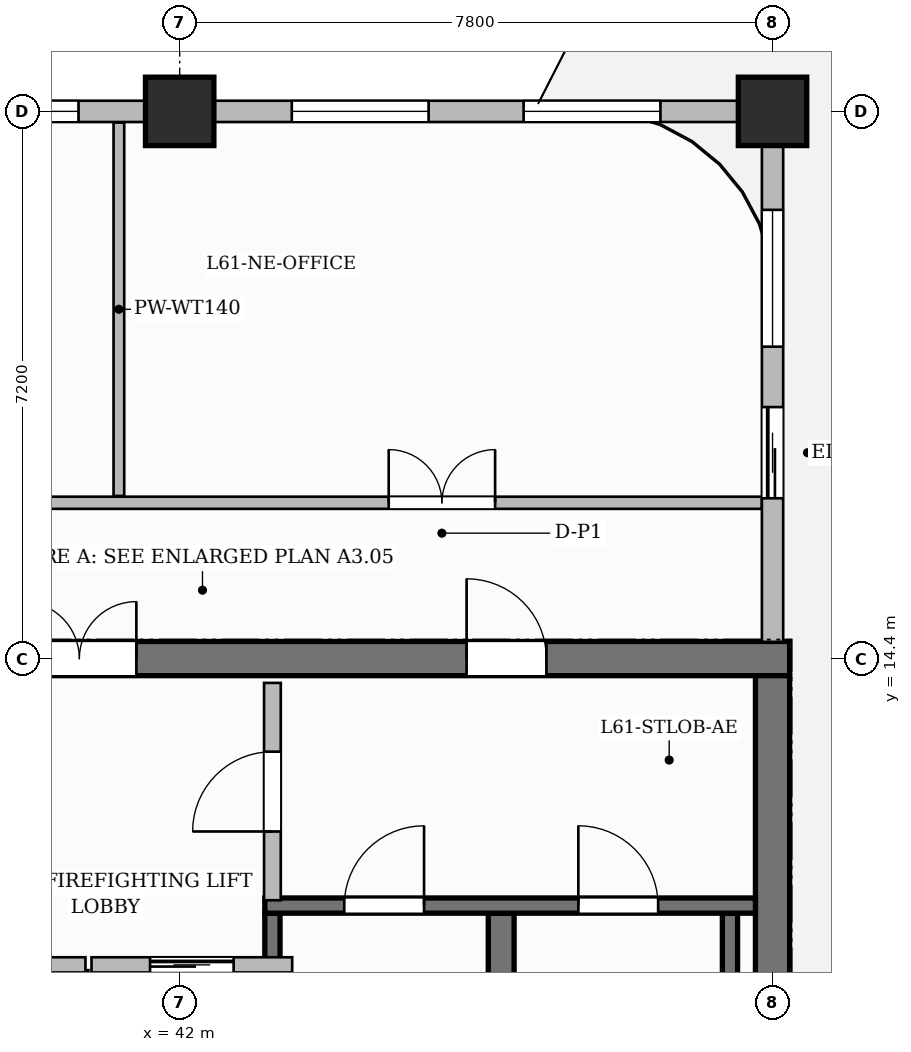
"""IFC4 building model, lengths in metres.
Left out: names, types, materials, properties, quantities, classifications, styles, units other than length and angle.
Written with IfcOpenShell. Run it as: python <this file> out.ifc"""

import sys

from ifc_helpers import new_model, si_unit, direction, frame, frame_2d, origin, origin_2d, place, context, subcontext, project, spatial, rectangle, extrude, source, transform, mapped, element, fill, save


model = new_model("IFC4")
c1 = context("Model", 3, precision=1e-05, world=origin(), true_north=direction((0.0, 1.0)))
c2 = subcontext(c1, "Body", "Model", "MODEL_VIEW")
j1 = project(units=[si_unit("LENGTHUNIT", "METRE"), si_unit("PLANEANGLEUNIT", "RADIAN")], contexts=[c1])
p1 = place(None, origin())
s1 = spatial("IfcSite", under=j1, at=p1, CompositionType="ELEMENT")
p2 = place(p1, origin())
s2 = spatial("IfcBuilding", under=s1, at=p2, CompositionType="ELEMENT")
p3 = place(p2, frame((0.0, 0.0, 244.25)))
s3 = spatial("IfcBuildingStorey", under=s2, at=p3, CompositionType="ELEMENT", Elevation=244.25)
p4 = place(p3, frame((34.575, 14.4, 0.0), z_axis=(0.0, 0.0, 1.0), x_axis=(1.0, 0.0, 0.0)))
e1 = element("IfcWall", 1, at=p4, inside=s3, PredefinedType="SHEAR", context=c2, shape_type="SweptSolid", body=[
    extrude(rectangle(XDim=15.45, YDim=0.45, at=frame_2d((7.725, 0.0))), origin(), (0.0, 0.0, 1.0), 3.85),
])
p5 = place(p4, frame((5.355, 0.0, 0.0)))
e2 = element("IfcOpeningElement", 2, at=p5, cuts=e1, PredefinedType="OPENING", context=c2, shape_type="SweptSolid", body=[
    extrude(rectangle(XDim=1.5, YDim=2.2, at=frame_2d((0.75, 1.1))), frame((0.0, 0.235, 0.0), z_axis=(0.0, -1.0, 0.0), x_axis=(1.0, 0.0, 0.0)), (0.0, 0.0, 1.0), 0.47),
])
p6 = place(p4, frame((1.57, 0.0, 0.0)))
e3 = element("IfcOpeningElement", 3, at=p6, cuts=e1, PredefinedType="OPENING", context=c2, shape_type="SweptSolid", body=[
    extrude(rectangle(XDim=1.05, YDim=2.15, at=frame_2d((0.525, 1.075))), frame((0.0, 0.235, 0.0), z_axis=(0.0, -1.0, 0.0), x_axis=(1.0, 0.0, 0.0)), (0.0, 0.0, 1.0), 0.47),
])
p7 = place(p4, frame((11.2, 0.0, 0.0)))
e4 = element("IfcOpeningElement", 4, at=p7, cuts=e1, PredefinedType="OPENING", context=c2, shape_type="SweptSolid", body=[
    extrude(rectangle(XDim=1.05, YDim=2.15, at=frame_2d((0.525, 1.075))), frame((0.0, 0.235, 0.0), z_axis=(0.0, -1.0, 0.0), x_axis=(1.0, 0.0, 0.0)), (0.0, 0.0, 1.0), 0.47),
])
p8 = place(p3, frame((49.8, 3.825, 0.0), z_axis=(0.0, 0.0, 1.0), x_axis=(0.0, 1.0, 0.0)))
e5 = element("IfcWall", 5, at=p8, inside=s3, PredefinedType="SHEAR", context=c2, shape_type="SweptSolid", body=[
    extrude(rectangle(XDim=10.35, YDim=0.45, at=frame_2d((5.175, 0.0))), origin(), (0.0, 0.0, 1.0), 3.85),
])
m1 = source(origin(), c2, "Body", "SweptSolid", [
    extrude(rectangle(XDim=0.9, YDim=0.9, at=origin_2d()), origin(), (0.0, 0.0, 1.0), 3.85),
])
for number, where, z_axis, x_axis in (
    (6, (42.0, 21.6, 0.0), (0.0, 0.0, 1.0), (1.0, 0.0, 0.0)),
    (7, (49.8, 21.6, 0.0), (0.0, 0.0, 1.0), (1.0, 0.0, 0.0)),
):
    element("IfcColumn", number, at=place(p3, frame(where, z_axis=z_axis, x_axis=x_axis)), inside=s3, PredefinedType="COLUMN", context=c2, shape_type="MappedRepresentation", body=[
        mapped(m1, transform((0.0, 0.0, 0.0), scale=1.0)),
    ])
p9 = place(p3, frame((43.22, 4.1, 0.0), z_axis=(0.0, 0.0, 1.0), x_axis=(0.0, 1.0, 0.0)))
e8 = element("IfcWall", 8, at=p9, inside=s3, PredefinedType="SHEAR", context=c2, shape_type="SweptSolid", body=[
    extrude(rectangle(XDim=6.95, YDim=0.2, at=frame_2d((3.475, 0.0))), origin(), (0.0, 0.0, 1.0), 3.85),
])
p10 = place(p3, frame((46.23, 4.1, 0.0), z_axis=(0.0, 0.0, 1.0), x_axis=(0.0, 1.0, 0.0)))
e9 = element("IfcWall", 9, at=p10, inside=s3, PredefinedType="SHEAR", context=c2, shape_type="SweptSolid", body=[
    extrude(rectangle(XDim=6.95, YDim=0.34, at=frame_2d((3.475, 0.0))), origin(), (0.0, 0.0, 1.0), 3.85),
])
p11 = place(p3, frame((49.24, 4.1, 0.0), z_axis=(0.0, 0.0, 1.0), x_axis=(0.0, 1.0, 0.0)))
e10 = element("IfcWall", 10, at=p11, inside=s3, PredefinedType="SHEAR", context=c2, shape_type="SweptSolid", body=[
    extrude(rectangle(XDim=6.95, YDim=0.2, at=frame_2d((3.475, 0.0))), origin(), (0.0, 0.0, 1.0), 3.85),
])
p12 = place(p3, frame((43.12, 11.15, 0.0), z_axis=(0.0, 0.0, 1.0), x_axis=(1.0, 0.0, 0.0)))
e11 = element("IfcWall", 11, at=p12, inside=s3, PredefinedType="SHEAR", context=c2, shape_type="SweptSolid", body=[
    extrude(rectangle(XDim=6.455, YDim=0.2, at=frame_2d((3.228, 0.0))), origin(), (0.0, 0.0, 1.0), 3.85),
])
p13 = place(p12, frame((1.045, 0.0, 0.0)))
e12 = element("IfcOpeningElement", 12, at=p13, cuts=e11, PredefinedType="OPENING", context=c2, shape_type="SweptSolid", body=[
    extrude(rectangle(XDim=1.05, YDim=2.2, at=frame_2d((0.525, 1.1))), frame((0.0, 0.11, 0.0), z_axis=(0.0, -1.0, 0.0), x_axis=(1.0, 0.0, 0.0)), (0.0, 0.0, 1.0), 0.22),
])
p14 = place(p12, frame((4.125, 0.0, 0.0)))
e13 = element("IfcOpeningElement", 13, at=p14, cuts=e11, PredefinedType="OPENING", context=c2, shape_type="SweptSolid", body=[
    extrude(rectangle(XDim=1.05, YDim=2.2, at=frame_2d((0.525, 1.1))), frame((0.0, 0.11, 0.0), z_axis=(0.0, -1.0, 0.0), x_axis=(1.0, 0.0, 0.0)), (0.0, 0.0, 1.0), 0.22),
])
p15 = place(p3, frame((40.7, 8.12, 0.0), z_axis=(0.0, 0.0, 1.0), x_axis=(0.0, 1.0, 0.0)))
e14 = element("IfcWall", 14, at=p15, inside=s3, PredefinedType="PARTITIONING", context=c2, shape_type="SweptSolid", body=[
    extrude(rectangle(XDim=2.18, YDim=0.2, at=frame_2d((1.09, 0.0))), origin(), (0.0, 0.0, 1.0), 3.6),
])
p16 = place(p3, frame((43.22, 11.22, 0.0), z_axis=(0.0, 0.0, 1.0), x_axis=(0.0, 1.0, 0.0)))
e15 = element("IfcWall", 15, at=p16, inside=s3, PredefinedType="PARTITIONING", context=c2, shape_type="SweptSolid", body=[
    extrude(rectangle(XDim=2.86, YDim=0.22, at=frame_2d((1.43, 0.0))), origin(), (0.0, 0.0, 1.0), 3.6),
])
p17 = place(p16, frame((0.905, 0.0, 0.0)))
e16 = element("IfcOpeningElement", 16, at=p17, cuts=e15, PredefinedType="OPENING", context=c2, shape_type="SweptSolid", body=[
    extrude(rectangle(XDim=1.05, YDim=2.15, at=frame_2d((0.525, 1.075))), frame((0.0, 0.12, 0.0), z_axis=(0.0, -1.0, 0.0), x_axis=(1.0, 0.0, 0.0)), (0.0, 0.0, 1.0), 0.24),
])
p18 = place(p3, frame((30.29, 16.45, 0.0), z_axis=(0.0, 0.0, 1.0), x_axis=(1.0, 0.0, 0.0)))
e17 = element("IfcWall", 17, at=p18, inside=s3, PredefinedType="PARTITIONING", context=c2, shape_type="SweptSolid", body=[
    extrude(rectangle(XDim=19.37, YDim=0.16, at=frame_2d((9.685, 0.0))), origin(), (0.0, 0.0, 1.0), 3.6),
])
p19 = place(p18, frame((1.185, 0.0, 0.0)))
e18 = element("IfcOpeningElement", 18, at=p19, cuts=e17, PredefinedType="OPENING", context=c2, shape_type="SweptSolid", body=[
    extrude(rectangle(XDim=0.85, YDim=2.1, at=frame_2d((0.425, 1.05))), frame((0.0, 0.09, 0.0), z_axis=(0.0, -1.0, 0.0), x_axis=(1.0, 0.0, 0.0)), (0.0, 0.0, 1.0), 0.18),
])
p20 = place(p18, frame((6.66, 0.0, 0.0)))
e19 = element("IfcOpeningElement", 19, at=p20, cuts=e17, PredefinedType="OPENING", context=c2, shape_type="SweptSolid", body=[
    extrude(rectangle(XDim=0.9, YDim=2.15, at=frame_2d((0.45, 1.075))), frame((0.0, 0.09, 0.0), z_axis=(0.0, -1.0, 0.0), x_axis=(1.0, 0.0, 0.0)), (0.0, 0.0, 1.0), 0.18),
])
p21 = place(p18, frame((14.46, 0.0, 0.0)))
e20 = element("IfcOpeningElement", 20, at=p21, cuts=e17, PredefinedType="OPENING", context=c2, shape_type="SweptSolid", body=[
    extrude(rectangle(XDim=1.4, YDim=2.35, at=frame_2d((0.7, 1.175))), frame((0.0, 0.09, 0.0), z_axis=(0.0, -1.0, 0.0), x_axis=(1.0, 0.0, 0.0)), (0.0, 0.0, 1.0), 0.18),
])
p22 = place(p3, frame((41.2, 16.54, 0.0), z_axis=(0.0, 0.0, 1.0), x_axis=(0.0, 1.0, 0.0)))
e21 = element("IfcWall", 21, at=p22, inside=s3, PredefinedType="PARTITIONING", context=c2, shape_type="SweptSolid", body=[
    extrude(rectangle(XDim=4.912, YDim=0.14, at=frame_2d((2.456, 0.0))), origin(), (0.0, 0.0, 1.0), 3.6),
])
p23 = place(p3, frame((38.12, 10.37, 0.0), z_axis=(0.0, 0.0, 1.0), x_axis=(1.0, 0.0, 0.0)))
e22 = element("IfcWall", 22, at=p23, inside=s3, PredefinedType="PARTITIONING", context=c2, shape_type="SweptSolid", body=[
    extrude(rectangle(XDim=2.64, YDim=0.2, at=frame_2d((1.32, 0.0))), origin(), (0.0, 0.0, 1.0), 3.6),
])
p24 = place(p23, frame((0.77, 0.0, 0.0)))
e23 = element("IfcOpeningElement", 23, at=p24, cuts=e22, PredefinedType="OPENING", context=c2, shape_type="SweptSolid", body=[
    extrude(rectangle(XDim=1.1, YDim=2.2, at=frame_2d((0.55, 1.1))), frame((0.0, 0.11, 0.0), z_axis=(0.0, -1.0, 0.0), x_axis=(1.0, 0.0, 0.0)), (0.0, 0.0, 1.0), 0.22),
])
p25 = place(p3, frame((40.84, 10.37, 0.0), z_axis=(0.0, 0.0, 1.0), x_axis=(1.0, 0.0, 0.0)))
e24 = element("IfcWall", 24, at=p25, inside=s3, PredefinedType="PARTITIONING", context=c2, shape_type="SweptSolid", body=[
    extrude(rectangle(XDim=2.64, YDim=0.2, at=frame_2d((1.32, 0.0))), origin(), (0.0, 0.0, 1.0), 3.6),
])
p26 = place(p25, frame((0.77, 0.0, 0.0)))
e25 = element("IfcOpeningElement", 25, at=p26, cuts=e24, PredefinedType="OPENING", context=c2, shape_type="SweptSolid", body=[
    extrude(rectangle(XDim=1.1, YDim=2.2, at=frame_2d((0.55, 1.1))), frame((0.0, 0.11, 0.0), z_axis=(0.0, -1.0, 0.0), x_axis=(1.0, 0.0, 0.0)), (0.0, 0.0, 1.0), 0.22),
])
p27 = place(p3, frame((49.8, 14.62, 0.0), z_axis=(0.0, 0.0, 1.0), x_axis=(0.0, 1.0, 0.0)))
e26 = element("IfcWall", 26, at=p27, inside=s3, PredefinedType="SOLIDWALL", context=c2, shape_type="SweptSolid", body=[
    extrude(rectangle(XDim=6.93, YDim=0.28, at=frame_2d((3.465, 0.0))), origin(), (0.0, 0.0, 1.0), 3.135),
])
p28 = place(p27, frame((1.889, 0.0, 0.0)))
e27 = element("IfcOpeningElement", 27, at=p28, cuts=e26, PredefinedType="OPENING", context=c2, shape_type="SweptSolid", body=[
    extrude(rectangle(XDim=1.2, YDim=2.2, at=frame_2d((0.6, 1.1))), frame((0.0, 0.15, 0.0), z_axis=(0.0, -1.0, 0.0), x_axis=(1.0, 0.0, 0.0)), (0.0, 0.0, 1.0), 0.3),
])
p29 = place(p27, frame((3.884, 0.0, 0.8)))
e28 = element("IfcOpeningElement", 28, at=p29, cuts=e26, PredefinedType="OPENING", context=c2, shape_type="SweptSolid", body=[
    extrude(rectangle(XDim=1.8, YDim=1.85, at=frame_2d((0.9, 0.925))), frame((0.0, 0.15, 0.0), z_axis=(0.0, -1.0, 0.0), x_axis=(1.0, 0.0, 0.0)), (0.0, 0.0, 1.0), 0.3),
])
p30 = place(p3, frame((14.4, 21.6, 0.0), z_axis=(0.0, 0.0, 1.0), x_axis=(1.0, 0.0, 0.0)))
e29 = element("IfcWall", 29, at=p30, inside=s3, PredefinedType="SOLIDWALL", context=c2, shape_type="SweptSolid", body=[
    extrude(rectangle(XDim=35.4, YDim=0.28, at=frame_2d((17.7, 0.0))), origin(), (0.0, 0.0, 1.0), 3.135),
])
p31 = place(p30, frame((0.85, 0.0, 0.0)))
e30 = element("IfcOpeningElement", 30, at=p31, cuts=e29, PredefinedType="OPENING", context=c2, shape_type="SweptSolid", body=[
    extrude(rectangle(XDim=1.2, YDim=2.2, at=frame_2d((0.6, 1.1))), frame((0.0, 0.15, 0.0), z_axis=(0.0, -1.0, 0.0), x_axis=(1.0, 0.0, 0.0)), (0.0, 0.0, 1.0), 0.3),
])
p32 = place(p30, frame((2.771, 0.0, 0.8)))
e31 = element("IfcOpeningElement", 31, at=p32, cuts=e29, PredefinedType="OPENING", context=c2, shape_type="SweptSolid", body=[
    extrude(rectangle(XDim=1.4, YDim=1.85, at=frame_2d((0.7, 0.925))), frame((0.0, 0.15, 0.0), z_axis=(0.0, -1.0, 0.0), x_axis=(1.0, 0.0, 0.0)), (0.0, 0.0, 1.0), 0.3),
])
p33 = place(p30, frame((4.929, 0.0, 0.8)))
e32 = element("IfcOpeningElement", 32, at=p33, cuts=e29, PredefinedType="OPENING", context=c2, shape_type="SweptSolid", body=[
    extrude(rectangle(XDim=1.15, YDim=1.8, at=frame_2d((0.575, 0.9))), frame((0.0, 0.15, 0.0), z_axis=(0.0, -1.0, 0.0), x_axis=(1.0, 0.0, 0.0)), (0.0, 0.0, 1.0), 0.3),
])
p34 = place(p30, frame((8.496, 0.0, 0.8)))
e33 = element("IfcOpeningElement", 33, at=p34, cuts=e29, PredefinedType="OPENING", context=c2, shape_type="SweptSolid", body=[
    extrude(rectangle(XDim=1.8, YDim=1.85, at=frame_2d((0.9, 0.925))), frame((0.0, 0.15, 0.0), z_axis=(0.0, -1.0, 0.0), x_axis=(1.0, 0.0, 0.0)), (0.0, 0.0, 1.0), 0.3),
])
p35 = place(p30, frame((11.304, 0.0, 0.8)))
e34 = element("IfcOpeningElement", 34, at=p35, cuts=e29, PredefinedType="OPENING", context=c2, shape_type="SweptSolid", body=[
    extrude(rectangle(XDim=1.8, YDim=1.85, at=frame_2d((0.9, 0.925))), frame((0.0, 0.15, 0.0), z_axis=(0.0, -1.0, 0.0), x_axis=(1.0, 0.0, 0.0)), (0.0, 0.0, 1.0), 0.3),
])
p36 = place(p30, frame((16.601, 0.0, 0.8)))
e35 = element("IfcOpeningElement", 35, at=p36, cuts=e29, PredefinedType="OPENING", context=c2, shape_type="SweptSolid", body=[
    extrude(rectangle(XDim=1.8, YDim=1.85, at=frame_2d((0.9, 0.925))), frame((0.0, 0.15, 0.0), z_axis=(0.0, -1.0, 0.0), x_axis=(1.0, 0.0, 0.0)), (0.0, 0.0, 1.0), 0.3),
])
p37 = place(p30, frame((21.723, 0.0, 0.8)))
e36 = element("IfcOpeningElement", 36, at=p37, cuts=e29, PredefinedType="OPENING", context=c2, shape_type="SweptSolid", body=[
    extrude(rectangle(XDim=1.8, YDim=1.85, at=frame_2d((0.9, 0.925))), frame((0.0, 0.15, 0.0), z_axis=(0.0, -1.0, 0.0), x_axis=(1.0, 0.0, 0.0)), (0.0, 0.0, 1.0), 0.3),
])
p38 = place(p30, frame((24.469, 0.0, 0.8)))
e37 = element("IfcOpeningElement", 37, at=p38, cuts=e29, PredefinedType="OPENING", context=c2, shape_type="SweptSolid", body=[
    extrude(rectangle(XDim=1.8, YDim=1.85, at=frame_2d((0.9, 0.925))), frame((0.0, 0.15, 0.0), z_axis=(0.0, -1.0, 0.0), x_axis=(1.0, 0.0, 0.0)), (0.0, 0.0, 1.0), 0.3),
])
p39 = place(p30, frame((29.075, 0.0, 0.8)))
e38 = element("IfcOpeningElement", 38, at=p39, cuts=e29, PredefinedType="OPENING", context=c2, shape_type="SweptSolid", body=[
    extrude(rectangle(XDim=1.8, YDim=1.85, at=frame_2d((0.9, 0.925))), frame((0.0, 0.15, 0.0), z_axis=(0.0, -1.0, 0.0), x_axis=(1.0, 0.0, 0.0)), (0.0, 0.0, 1.0), 0.3),
])
p40 = place(p30, frame((32.125, 0.0, 0.8)))
e39 = element("IfcOpeningElement", 39, at=p40, cuts=e29, PredefinedType="OPENING", context=c2, shape_type="SweptSolid", body=[
    extrude(rectangle(XDim=1.8, YDim=1.85, at=frame_2d((0.9, 0.925))), frame((0.0, 0.15, 0.0), z_axis=(0.0, -1.0, 0.0), x_axis=(1.0, 0.0, 0.0)), (0.0, 0.0, 1.0), 0.3),
])
m2 = source(origin(), c2, "Body", "SweptSolid", [
    extrude(rectangle(XDim=1.05, YDim=2.2, at=frame_2d((0.525, 1.1))), frame((0.0, 0.025, 0.0), z_axis=(0.0, -1.0, 0.0), x_axis=(1.0, 0.0, 0.0)), (0.0, 0.0, 1.0), 0.05),
])
p41 = place(p13, origin())
e40 = element("IfcDoor", 40, at=p41, inside=s3, OperationType="SINGLE_SWING_RIGHT", PredefinedType="DOOR", context=c2, shape_type="MappedRepresentation", body=[
    mapped(m2, transform((0.0, 0.0, 0.0), scale=1.0)),
])
fill(e12, e40)
p42 = place(p14, origin())
e41 = element("IfcDoor", 41, at=p42, inside=s3, OperationType="SINGLE_SWING_LEFT", PredefinedType="DOOR", context=c2, shape_type="MappedRepresentation", body=[
    mapped(m2, transform((0.0, 0.0, 0.0), scale=1.0)),
])
fill(e13, e41)
m3 = source(origin(), c2, "Body", "SweptSolid", [
    extrude(rectangle(XDim=1.05, YDim=2.15, at=frame_2d((0.525, 1.075))), frame((0.0, 0.025, 0.0), z_axis=(0.0, -1.0, 0.0), x_axis=(1.0, 0.0, 0.0)), (0.0, 0.0, 1.0), 0.05),
])
p43 = place(p17, origin())
e42 = element("IfcDoor", 42, at=p43, inside=s3, OperationType="SINGLE_SWING_LEFT", PredefinedType="DOOR", context=c2, shape_type="MappedRepresentation", body=[
    mapped(m3, transform((0.0, 0.0, 0.0), scale=1.0)),
])
fill(e16, e42)
m4 = source(origin(), c2, "Body", "SweptSolid", [
    extrude(rectangle(XDim=1.5, YDim=2.2, at=frame_2d((0.75, 1.1))), frame((0.0, 0.025, 0.0), z_axis=(0.0, -1.0, 0.0), x_axis=(1.0, 0.0, 0.0)), (0.0, 0.0, 1.0), 0.05),
])
p44 = place(p5, origin())
e43 = element("IfcDoor", 43, at=p44, inside=s3, OperationType="DOUBLE_DOOR_SINGLE_SWING", PredefinedType="DOOR", context=c2, shape_type="MappedRepresentation", body=[
    mapped(m4, transform((0.0, 0.0, 0.0), scale=1.0)),
])
fill(e2, e43)
p45 = place(p7, origin())
e44 = element("IfcDoor", 44, at=p45, inside=s3, OperationType="SINGLE_SWING_LEFT", PredefinedType="DOOR", context=c2, shape_type="MappedRepresentation", body=[
    mapped(m3, transform((0.0, 0.0, 0.0), scale=1.0)),
])
fill(e4, e44)
m5 = source(origin(), c2, "Body", "SweptSolid", [
    extrude(rectangle(XDim=1.4, YDim=2.35, at=frame_2d((0.7, 1.175))), frame((0.0, 0.025, 0.0), z_axis=(0.0, -1.0, 0.0), x_axis=(1.0, 0.0, 0.0)), (0.0, 0.0, 1.0), 0.05),
])
p46 = place(p21, origin())
e45 = element("IfcDoor", 45, at=p46, inside=s3, OperationType="DOUBLE_DOOR_SINGLE_SWING", PredefinedType="DOOR", context=c2, shape_type="MappedRepresentation", body=[
    mapped(m5, transform((0.0, 0.0, 0.0), scale=1.0)),
])
fill(e20, e45)
m6 = source(origin(), c2, "Body", "SweptSolid", [
    extrude(rectangle(XDim=1.1, YDim=2.2, at=frame_2d((0.55, 1.1))), frame((0.0, 0.025, 0.0), z_axis=(0.0, -1.0, 0.0), x_axis=(1.0, 0.0, 0.0)), (0.0, 0.0, 1.0), 0.05),
])
p47 = place(p26, origin())
e46 = element("IfcDoor", 46, at=p47, inside=s3, OperationType="SLIDING_TO_LEFT", PredefinedType="DOOR", context=c2, shape_type="MappedRepresentation", body=[
    mapped(m6, transform((0.0, 0.0, 0.0), scale=1.0)),
])
fill(e25, e46)
m7 = source(origin(), c2, "Body", "SweptSolid", [
    extrude(rectangle(XDim=1.2, YDim=2.2, at=frame_2d((0.6, 1.1))), frame((0.0, 0.025, 0.0), z_axis=(0.0, -1.0, 0.0), x_axis=(1.0, 0.0, 0.0)), (0.0, 0.0, 1.0), 0.05),
])
p48 = place(p28, origin())
e47 = element("IfcDoor", 47, at=p48, inside=s3, OperationType="SLIDING_TO_LEFT", PredefinedType="DOOR", context=c2, shape_type="MappedRepresentation", body=[
    mapped(m7, transform((0.0, 0.0, 0.0), scale=1.0)),
])
fill(e27, e47)
m8 = source(origin(), c2, "Body", "SweptSolid", [
    extrude(rectangle(XDim=1.8, YDim=1.85, at=frame_2d((0.9, 0.925))), frame((0.0, 0.03, 0.0), z_axis=(0.0, -1.0, 0.0), x_axis=(1.0, 0.0, 0.0)), (0.0, 0.0, 1.0), 0.06),
])
p49 = place(p29, origin())
e48 = element("IfcWindow", 48, at=p49, inside=s3, PartitioningType="DOUBLE_PANEL_VERTICAL", PredefinedType="WINDOW", context=c2, shape_type="MappedRepresentation", body=[
    mapped(m8, transform((0.0, 0.0, 0.0), scale=1.0)),
])
fill(e28, e48)
p50 = place(p38, origin())
e49 = element("IfcWindow", 49, at=p50, inside=s3, PartitioningType="DOUBLE_PANEL_VERTICAL", PredefinedType="WINDOW", context=c2, shape_type="MappedRepresentation", body=[
    mapped(m8, transform((0.0, 0.0, 0.0), scale=1.0)),
])
fill(e37, e49)
p51 = place(p39, origin())
e50 = element("IfcWindow", 50, at=p51, inside=s3, PartitioningType="DOUBLE_PANEL_VERTICAL", PredefinedType="WINDOW", context=c2, shape_type="MappedRepresentation", body=[
    mapped(m8, transform((0.0, 0.0, 0.0), scale=1.0)),
])
fill(e38, e50)
p52 = place(p40, origin())
e51 = element("IfcWindow", 51, at=p52, inside=s3, PartitioningType="DOUBLE_PANEL_VERTICAL", PredefinedType="WINDOW", context=c2, shape_type="MappedRepresentation", body=[
    mapped(m8, transform((0.0, 0.0, 0.0), scale=1.0)),
])
fill(e39, e51)
save(model, sys.argv[1])
